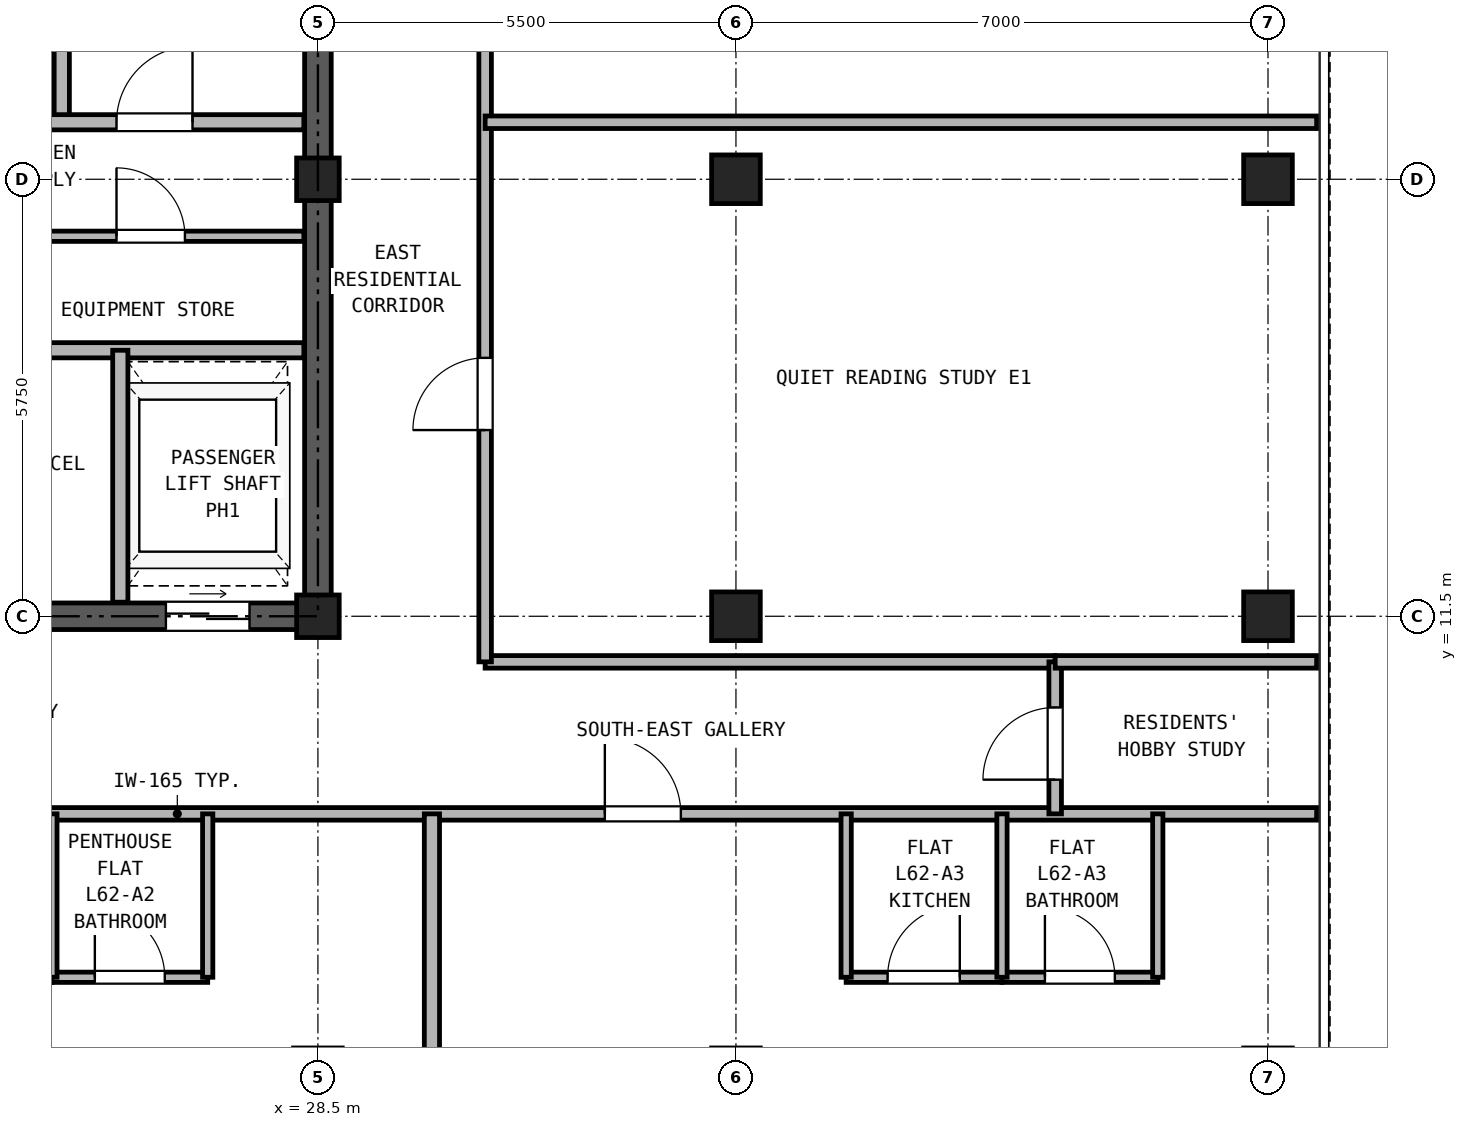
"""IFC4 building model, lengths in metres.
Left out: names, types, materials, properties, quantities, classifications, styles, units other than length and angle.
Written with IfcOpenShell. Run it as: python <this file> out.ifc"""

import sys

from ifc_helpers import new_model, si_unit, direction, frame, frame_2d, origin, origin_2d, place, context, subcontext, project, spatial, rectangle, hollow_rectangle, extrude, source, transform, mapped, element, fill, save


model = new_model("IFC4")
c1 = context("Model", 3, precision=1e-05, world=origin(), true_north=direction((0.0, 1.0)))
c2 = subcontext(c1, "Body", "Model", "MODEL_VIEW")
j1 = project(units=[si_unit("LENGTHUNIT", "METRE"), si_unit("PLANEANGLEUNIT", "RADIAN")], contexts=[c1])
p1 = place(None, origin())
s1 = spatial("IfcSite", under=j1, at=p1, CompositionType="ELEMENT")
p2 = place(p1, origin())
s2 = spatial("IfcBuilding", under=s1, at=p2, CompositionType="ELEMENT")
p3 = place(p2, frame((0.0, 0.0, 220.1)))
s3 = spatial("IfcBuildingStorey", under=s2, at=p3, CompositionType="ELEMENT", Elevation=220.1)
m1 = source(origin(), c2, "Body", "SweptSolid", [
    extrude(hollow_rectangle(XDim=0.64, YDim=0.64, WallThickness=0.035, at=origin_2d()), origin(), (0.0, 0.0, 1.0), 2.98),
])
for number, where, z_axis, x_axis in (
    (1, (41.0, 11.5, 0.0), (0.0, 0.0, 1.0), (1.0, 0.0, 0.0)),
    (2, (41.0, 17.25, 0.0), (0.0, 0.0, 1.0), (1.0, 0.0, 0.0)),
):
    element("IfcColumn", number, at=place(p3, frame(where, z_axis=z_axis, x_axis=x_axis)), inside=s3, PredefinedType="COLUMN", context=c2, shape_type="MappedRepresentation", body=[
        mapped(m1, transform((0.0, 0.0, 0.0), x_axis=(1.0, 0.0, 0.0), y_axis=(0.0, 1.0, 0.0), z_axis=(0.0, 0.0, 1.0), scale=1.0)),
    ])
m2 = source(origin(), c2, "Body", "SweptSolid", [
    extrude(hollow_rectangle(XDim=0.56, YDim=0.56, WallThickness=0.03, at=origin_2d()), origin(), (0.0, 0.0, 1.0), 2.98),
])
for number, where, z_axis, x_axis in (
    (3, (28.5, 11.5, 0.0), (0.0, 0.0, 1.0), (1.0, 0.0, 0.0)),
    (4, (28.5, 17.25, 0.0), (0.0, 0.0, 1.0), (1.0, 0.0, 0.0)),
):
    element("IfcColumn", number, at=place(p3, frame(where, z_axis=z_axis, x_axis=x_axis)), inside=s3, PredefinedType="COLUMN", context=c2, shape_type="MappedRepresentation", body=[
        mapped(m2, transform((0.0, 0.0, 0.0), x_axis=(1.0, 0.0, 0.0), y_axis=(0.0, 1.0, 0.0), z_axis=(0.0, 0.0, 1.0), scale=1.0)),
    ])
for number, where, z_axis, x_axis in (
    (5, (34.0, 11.5, 0.0), (0.0, 0.0, 1.0), (1.0, 0.0, 0.0)),
    (6, (34.0, 17.25, 0.0), (0.0, 0.0, 1.0), (1.0, 0.0, 0.0)),
):
    element("IfcColumn", number, at=place(p3, frame(where, z_axis=z_axis, x_axis=x_axis)), inside=s3, PredefinedType="COLUMN", context=c2, shape_type="MappedRepresentation", body=[
        mapped(m1, transform((0.0, 0.0, 0.0), x_axis=(1.0, 0.0, 0.0), y_axis=(0.0, 1.0, 0.0), z_axis=(0.0, 0.0, 1.0), scale=1.0)),
    ])
p4 = place(p3, frame((18.325, 11.5, 0.0), z_axis=(0.0, 0.0, 1.0), x_axis=(1.0, 0.0, 0.0)))
e7 = element("IfcWall", 7, at=p4, inside=s3, PredefinedType="SHEAR", context=c2, shape_type="SweptSolid", body=[
    extrude(rectangle(XDim=10.35, YDim=0.35, at=frame_2d((5.175, 0.0))), origin(), (0.0, 0.0, 1.0), 2.98),
])
p5 = place(p4, frame((1.775, 0.0, 0.0)))
e8 = element("IfcOpeningElement", 8, at=p5, cuts=e7, PredefinedType="OPENING", context=c2, shape_type="SweptSolid", body=[
    extrude(rectangle(XDim=0.95, YDim=2.15, at=frame_2d((0.475, 1.075))), frame((0.0, 0.185, 0.0), z_axis=(0.0, -1.0, 0.0), x_axis=(1.0, 0.0, 0.0)), (0.0, 0.0, 1.0), 0.37),
])
p6 = place(p4, frame((5.275, 0.0, 0.0)))
e9 = element("IfcOpeningElement", 9, at=p6, cuts=e7, PredefinedType="OPENING", context=c2, shape_type="SweptSolid", body=[
    extrude(rectangle(XDim=0.95, YDim=2.15, at=frame_2d((0.475, 1.075))), frame((0.0, 0.185, 0.0), z_axis=(0.0, -1.0, 0.0), x_axis=(1.0, 0.0, 0.0)), (0.0, 0.0, 1.0), 0.37),
])
p7 = place(p4, frame((8.175, 0.0, 0.0)))
e10 = element("IfcOpeningElement", 10, at=p7, cuts=e7, PredefinedType="OPENING", context=c2, shape_type="SweptSolid", body=[
    extrude(rectangle(XDim=1.1, YDim=2.25, at=frame_2d((0.55, 1.125))), frame((0.0, 0.185, 0.0), z_axis=(0.0, -1.0, 0.0), x_axis=(1.0, 0.0, 0.0)), (0.0, 0.0, 1.0), 0.37),
])
p8 = place(p3, frame((28.5, 11.675, 0.0), z_axis=(0.0, 0.0, 1.0), x_axis=(0.0, 1.0, 0.0)))
e11 = element("IfcWall", 11, at=p8, inside=s3, PredefinedType="SHEAR", context=c2, shape_type="SweptSolid", body=[
    extrude(rectangle(XDim=16.9, YDim=0.35, at=frame_2d((8.45, 0.0))), origin(), (0.0, 0.0, 1.0), 2.98),
])
p9 = place(p8, frame((7.475, 0.0, 0.0)))
e12 = element("IfcOpeningElement", 12, at=p9, cuts=e11, PredefinedType="OPENING", context=c2, shape_type="SweptSolid", body=[
    extrude(rectangle(XDim=1.15, YDim=2.2, at=frame_2d((0.575, 1.1))), frame((0.0, 0.185, 0.0), z_axis=(0.0, -1.0, 0.0), x_axis=(1.0, 0.0, 0.0)), (0.0, 0.0, 1.0), 0.37),
])
p10 = place(p3, frame((25.13, 18.0, 0.0), z_axis=(0.0, 0.0, 1.0), x_axis=(0.0, 1.0, 0.0)))
e13 = element("IfcWall", 13, at=p10, inside=s3, PredefinedType="PARTITIONING", context=c2, shape_type="SweptSolid", body=[
    extrude(rectangle(XDim=3.39, YDim=0.2, at=frame_2d((1.695, 0.0))), origin(), (0.0, 0.0, 1.0), 2.98),
])
p11 = place(p10, frame((1.1, 0.0, 0.0)))
e14 = element("IfcOpeningElement", 14, at=p11, cuts=e13, PredefinedType="OPENING", context=c2, shape_type="SweptSolid", body=[
    extrude(rectangle(XDim=1.15, YDim=2.2, at=frame_2d((0.575, 1.1))), frame((0.0, 0.11, 0.0), z_axis=(0.0, -1.0, 0.0), x_axis=(1.0, 0.0, 0.0)), (0.0, 0.0, 1.0), 0.22),
])
p12 = place(p3, frame((18.685, 18.0, 0.0), z_axis=(0.0, 0.0, 1.0), x_axis=(1.0, 0.0, 0.0)))
e15 = element("IfcWall", 15, at=p12, inside=s3, PredefinedType="PARTITIONING", context=c2, shape_type="SweptSolid", body=[
    extrude(rectangle(XDim=9.63, YDim=0.2, at=frame_2d((4.815, 0.0))), origin(), (0.0, 0.0, 1.0), 2.98),
])
p13 = place(p12, frame((0.565, 0.0, 0.0)))
e16 = element("IfcOpeningElement", 16, at=p13, cuts=e15, PredefinedType="OPENING", context=c2, shape_type="SweptSolid", body=[
    extrude(rectangle(XDim=1.3, YDim=2.3, at=frame_2d((0.65, 1.15))), frame((0.0, 0.11, 0.0), z_axis=(0.0, -1.0, 0.0), x_axis=(1.0, 0.0, 0.0)), (0.0, 0.0, 1.0), 0.22),
])
p14 = place(p12, frame((2.665, 0.0, 0.0)))
e17 = element("IfcOpeningElement", 17, at=p14, cuts=e15, PredefinedType="OPENING", context=c2, shape_type="SweptSolid", body=[
    extrude(rectangle(XDim=1.3, YDim=2.3, at=frame_2d((0.65, 1.15))), frame((0.0, 0.11, 0.0), z_axis=(0.0, -1.0, 0.0), x_axis=(1.0, 0.0, 0.0)), (0.0, 0.0, 1.0), 0.22),
])
p15 = place(p12, frame((7.165, 0.0, 0.0)))
e18 = element("IfcOpeningElement", 18, at=p15, cuts=e15, PredefinedType="OPENING", context=c2, shape_type="SweptSolid", body=[
    extrude(rectangle(XDim=1.0, YDim=2.15, at=frame_2d((0.5, 1.075))), frame((0.0, 0.11, 0.0), z_axis=(0.0, -1.0, 0.0), x_axis=(1.0, 0.0, 0.0)), (0.0, 0.0, 1.0), 0.22),
])
p16 = place(p3, frame((18.685, 15.0, 0.0), z_axis=(0.0, 0.0, 1.0), x_axis=(1.0, 0.0, 0.0)))
e19 = element("IfcWall", 19, at=p16, inside=s3, PredefinedType="PARTITIONING", context=c2, shape_type="SweptSolid", body=[
    extrude(rectangle(XDim=9.63, YDim=0.2, at=frame_2d((4.815, 0.0))), origin(), (0.0, 0.0, 1.0), 2.98),
])
p17 = place(p3, frame((23.3, 16.5, 0.0), z_axis=(0.0, 0.0, 1.0), x_axis=(1.0, 0.0, 0.0)))
e20 = element("IfcWall", 20, at=p17, inside=s3, PredefinedType="PARTITIONING", context=c2, shape_type="SweptSolid", body=[
    extrude(rectangle(XDim=5.015, YDim=0.135, at=frame_2d((2.507, 0.0))), origin(), (0.0, 0.0, 1.0), 2.98),
])
p18 = place(p17, frame((2.55, 0.0, 0.0)))
e21 = element("IfcOpeningElement", 21, at=p18, cuts=e20, PredefinedType="OPENING", context=c2, shape_type="SweptSolid", body=[
    extrude(rectangle(XDim=0.9, YDim=2.05, at=frame_2d((0.45, 1.025))), frame((0.0, 0.077, 0.0), z_axis=(0.0, -1.0, 0.0), x_axis=(1.0, 0.0, 0.0)), (0.0, 0.0, 1.0), 0.155),
])
p19 = place(p3, frame((25.9, 11.685, 0.0), z_axis=(0.0, 0.0, 1.0), x_axis=(0.0, 1.0, 0.0)))
e22 = element("IfcWall", 22, at=p19, inside=s3, PredefinedType="PARTITIONING", context=c2, shape_type="SweptSolid", body=[
    extrude(rectangle(XDim=3.315, YDim=0.2, at=frame_2d((1.657, 0.0))), origin(), (0.0, 0.0, 1.0), 2.98),
])
p20 = place(p3, frame((5.36, 8.9, 0.0), z_axis=(0.0, 0.0, 1.0), x_axis=(1.0, 0.0, 0.0)))
e23 = element("IfcWall", 23, at=p20, inside=s3, PredefinedType="PARTITIONING", context=c2, shape_type="SweptSolid", body=[
    extrude(rectangle(XDim=36.28, YDim=0.165, at=frame_2d((18.14, 0.0))), origin(), (0.0, 0.0, 1.0), 2.98),
])
p21 = place(p20, frame((8.865, 0.0, 0.0)))
e24 = element("IfcOpeningElement", 24, at=p21, cuts=e23, PredefinedType="OPENING", context=c2, shape_type="SweptSolid", body=[
    extrude(rectangle(XDim=1.0, YDim=2.15, at=frame_2d((0.5, 1.075))), frame((0.0, 0.093, 0.0), z_axis=(0.0, -1.0, 0.0), x_axis=(1.0, 0.0, 0.0)), (0.0, 0.0, 1.0), 0.185),
])
p22 = place(p20, frame((14.665, 0.0, 0.0)))
e25 = element("IfcOpeningElement", 25, at=p22, cuts=e23, PredefinedType="OPENING", context=c2, shape_type="SweptSolid", body=[
    extrude(rectangle(XDim=1.0, YDim=2.15, at=frame_2d((0.5, 1.075))), frame((0.0, 0.093, 0.0), z_axis=(0.0, -1.0, 0.0), x_axis=(1.0, 0.0, 0.0)), (0.0, 0.0, 1.0), 0.185),
])
p23 = place(p20, frame((26.915, 0.0, 0.0)))
e26 = element("IfcOpeningElement", 26, at=p23, cuts=e23, PredefinedType="OPENING", context=c2, shape_type="SweptSolid", body=[
    extrude(rectangle(XDim=1.0, YDim=2.15, at=frame_2d((0.5, 1.075))), frame((0.0, 0.093, 0.0), z_axis=(0.0, -1.0, 0.0), x_axis=(1.0, 0.0, 0.0)), (0.0, 0.0, 1.0), 0.185),
])
p24 = place(p3, frame((30.7, 10.9, 0.0), z_axis=(0.0, 0.0, 1.0), x_axis=(1.0, 0.0, 0.0)))
e27 = element("IfcWall", 27, at=p24, inside=s3, PredefinedType="PARTITIONING", context=c2, shape_type="SweptSolid", body=[
    extrude(rectangle(XDim=7.5, YDim=0.165, at=frame_2d((3.75, 0.0))), origin(), (0.0, 0.0, 1.0), 2.98),
])
p25 = place(p3, frame((38.2, 8.9, 0.0), z_axis=(0.0, 0.0, 1.0), x_axis=(0.0, 1.0, 0.0)))
e28 = element("IfcWall", 28, at=p25, inside=s3, PredefinedType="PARTITIONING", context=c2, shape_type="SweptSolid", body=[
    extrude(rectangle(XDim=2.0, YDim=0.165, at=frame_2d((1.0, 0.0))), origin(), (0.0, 0.0, 1.0), 2.98),
])
p26 = place(p25, frame((0.45, 0.0, 0.0)))
e29 = element("IfcOpeningElement", 29, at=p26, cuts=e28, PredefinedType="OPENING", context=c2, shape_type="SweptSolid", body=[
    extrude(rectangle(XDim=0.95, YDim=2.15, at=frame_2d((0.475, 1.075))), frame((0.0, 0.093, 0.0), z_axis=(0.0, -1.0, 0.0), x_axis=(1.0, 0.0, 0.0)), (0.0, 0.0, 1.0), 0.185),
])
p27 = place(p3, frame((30.7, 10.9, 0.0), z_axis=(0.0, 0.0, 1.0), x_axis=(0.0, 1.0, 0.0)))
e30 = element("IfcWall", 30, at=p27, inside=s3, PredefinedType="PARTITIONING", context=c2, shape_type="SweptSolid", body=[
    extrude(rectangle(XDim=24.24, YDim=0.165, at=frame_2d((12.12, 0.0))), origin(), (0.0, 0.0, 1.0), 2.98),
])
p28 = place(p27, frame((3.05, 0.0, 0.0)))
e31 = element("IfcOpeningElement", 31, at=p28, cuts=e30, PredefinedType="OPENING", context=c2, shape_type="SweptSolid", body=[
    extrude(rectangle(XDim=0.95, YDim=2.15, at=frame_2d((0.475, 1.075))), frame((0.0, 0.093, 0.0), z_axis=(0.0, -1.0, 0.0), x_axis=(1.0, 0.0, 0.0)), (0.0, 0.0, 1.0), 0.185),
])
p29 = place(p27, frame((9.85, 0.0, 0.0)))
e32 = element("IfcOpeningElement", 32, at=p29, cuts=e30, PredefinedType="OPENING", context=c2, shape_type="SweptSolid", body=[
    extrude(rectangle(XDim=0.95, YDim=2.15, at=frame_2d((0.475, 1.075))), frame((0.0, 0.093, 0.0), z_axis=(0.0, -1.0, 0.0), x_axis=(1.0, 0.0, 0.0)), (0.0, 0.0, 1.0), 0.185),
])
p30 = place(p27, frame((15.95, 0.0, 0.0)))
e33 = element("IfcOpeningElement", 33, at=p30, cuts=e30, PredefinedType="OPENING", context=c2, shape_type="SweptSolid", body=[
    extrude(rectangle(XDim=0.95, YDim=2.15, at=frame_2d((0.475, 1.075))), frame((0.0, 0.093, 0.0), z_axis=(0.0, -1.0, 0.0), x_axis=(1.0, 0.0, 0.0)), (0.0, 0.0, 1.0), 0.185),
])
p31 = place(p27, frame((21.27, 0.0, 0.0)))
e34 = element("IfcOpeningElement", 34, at=p31, cuts=e30, PredefinedType="OPENING", context=c2, shape_type="SweptSolid", body=[
    extrude(rectangle(XDim=0.95, YDim=2.15, at=frame_2d((0.475, 1.075))), frame((0.0, 0.093, 0.0), z_axis=(0.0, -1.0, 0.0), x_axis=(1.0, 0.0, 0.0)), (0.0, 0.0, 1.0), 0.185),
])
p32 = place(p3, frame((25.0, 6.75, 0.0), z_axis=(0.0, 0.0, 1.0), x_axis=(1.0, 0.0, 0.0)))
e35 = element("IfcWall", 35, at=p32, inside=s3, PredefinedType="PARTITIONING", context=c2, shape_type="SweptSolid", body=[
    extrude(rectangle(XDim=2.05, YDim=0.135, at=frame_2d((1.025, 0.0))), origin(), (0.0, 0.0, 1.0), 2.98),
])
p33 = place(p32, frame((0.565, 0.0, 0.0)))
e36 = element("IfcOpeningElement", 36, at=p33, cuts=e35, PredefinedType="OPENING", context=c2, shape_type="SweptSolid", body=[
    extrude(rectangle(XDim=0.92, YDim=2.1, at=frame_2d((0.46, 1.05))), frame((0.0, 0.077, 0.0), z_axis=(0.0, -1.0, 0.0), x_axis=(1.0, 0.0, 0.0)), (0.0, 0.0, 1.0), 0.155),
])
for number, where, z_axis, x_axis in (
    (37, (25.0, 6.75, 0.0), (0.0, 0.0, 1.0), (0.0, 1.0, 0.0)),
    (38, (27.05, 6.75, 0.0), (0.0, 0.0, 1.0), (0.0, 1.0, 0.0)),
):
    element("IfcWall", number, at=place(p3, frame(where, z_axis=z_axis, x_axis=x_axis)), inside=s3, PredefinedType="PARTITIONING", context=c2, shape_type="SweptSolid", body=[
        extrude(rectangle(XDim=2.15, YDim=0.135, at=frame_2d((1.075, 0.0))), origin(), (0.0, 0.0, 1.0), 2.98),
    ])
p34 = place(p3, frame((30.0, 0.16, 0.0), z_axis=(0.0, 0.0, 1.0), x_axis=(0.0, 1.0, 0.0)))
e39 = element("IfcWall", 39, at=p34, inside=s3, PredefinedType="PARTITIONING", context=c2, shape_type="SweptSolid", body=[
    extrude(rectangle(XDim=8.74, YDim=0.2, at=frame_2d((4.37, 0.0))), origin(), (0.0, 0.0, 1.0), 2.98),
])
p35 = place(p3, frame((35.45, 6.75, 0.0), z_axis=(0.0, 0.0, 1.0), x_axis=(1.0, 0.0, 0.0)))
e40 = element("IfcWall", 40, at=p35, inside=s3, PredefinedType="PARTITIONING", context=c2, shape_type="SweptSolid", body=[
    extrude(rectangle(XDim=2.05, YDim=0.135, at=frame_2d((1.025, 0.0))), origin(), (0.0, 0.0, 1.0), 2.98),
])
p36 = place(p35, frame((0.545, 0.0, 0.0)))
e41 = element("IfcOpeningElement", 41, at=p36, cuts=e40, PredefinedType="OPENING", context=c2, shape_type="SweptSolid", body=[
    extrude(rectangle(XDim=0.95, YDim=2.15, at=frame_2d((0.475, 1.075))), frame((0.0, 0.077, 0.0), z_axis=(0.0, -1.0, 0.0), x_axis=(1.0, 0.0, 0.0)), (0.0, 0.0, 1.0), 0.155),
])
p37 = place(p3, frame((37.5, 6.75, 0.0), z_axis=(0.0, 0.0, 1.0), x_axis=(1.0, 0.0, 0.0)))
e42 = element("IfcWall", 42, at=p37, inside=s3, PredefinedType="PARTITIONING", context=c2, shape_type="SweptSolid", body=[
    extrude(rectangle(XDim=2.05, YDim=0.135, at=frame_2d((1.025, 0.0))), origin(), (0.0, 0.0, 1.0), 2.98),
])
p38 = place(p37, frame((0.565, 0.0, 0.0)))
e43 = element("IfcOpeningElement", 43, at=p38, cuts=e42, PredefinedType="OPENING", context=c2, shape_type="SweptSolid", body=[
    extrude(rectangle(XDim=0.92, YDim=2.1, at=frame_2d((0.46, 1.05))), frame((0.0, 0.077, 0.0), z_axis=(0.0, -1.0, 0.0), x_axis=(1.0, 0.0, 0.0)), (0.0, 0.0, 1.0), 0.155),
])
for number, where, z_axis, x_axis in (
    (44, (35.45, 6.75, 0.0), (0.0, 0.0, 1.0), (0.0, 1.0, 0.0)),
    (45, (37.5, 6.75, 0.0), (0.0, 0.0, 1.0), (0.0, 1.0, 0.0)),
    (46, (39.55, 6.75, 0.0), (0.0, 0.0, 1.0), (0.0, 1.0, 0.0)),
):
    element("IfcWall", number, at=place(p3, frame(where, z_axis=z_axis, x_axis=x_axis)), inside=s3, PredefinedType="PARTITIONING", context=c2, shape_type="SweptSolid", body=[
        extrude(rectangle(XDim=2.15, YDim=0.135, at=frame_2d((1.075, 0.0))), origin(), (0.0, 0.0, 1.0), 2.98),
    ])
p39 = place(p3, frame((38.2, 10.9, 0.0), z_axis=(0.0, 0.0, 1.0), x_axis=(1.0, 0.0, 0.0)))
e47 = element("IfcWall", 47, at=p39, inside=s3, PredefinedType="PARTITIONING", context=c2, shape_type="SweptSolid", body=[
    extrude(rectangle(XDim=3.44, YDim=0.165, at=frame_2d((1.72, 0.0))), origin(), (0.0, 0.0, 1.0), 2.98),
])
p40 = place(p3, frame((30.7, 18.0, 0.0), z_axis=(0.0, 0.0, 1.0), x_axis=(1.0, 0.0, 0.0)))
e48 = element("IfcWall", 48, at=p40, inside=s3, PredefinedType="PARTITIONING", context=c2, shape_type="SweptSolid", body=[
    extrude(rectangle(XDim=10.94, YDim=0.165, at=frame_2d((5.47, 0.0))), origin(), (0.0, 0.0, 1.0), 2.98),
])
p41 = place(p15, frame((1.0, 0.0, 0.0), z_axis=(0.0, 0.0, 1.0), x_axis=(-1.0, 0.0, 0.0)))
e49 = element("IfcDoor", 49, at=p41, inside=s3, OperationType="SINGLE_SWING_RIGHT", PredefinedType="DOOR", context=c2, shape_type="SweptSolid", body=[
    extrude(rectangle(XDim=1.0, YDim=2.15, at=frame_2d((0.5, 1.075))), frame((0.0, 0.025, 0.0), z_axis=(0.0, -1.0, 0.0), x_axis=(1.0, 0.0, 0.0)), (0.0, 0.0, 1.0), 0.05),
])
fill(e18, e49)
p42 = place(p18, frame((0.9, 0.0, 0.0), z_axis=(0.0, 0.0, 1.0), x_axis=(-1.0, 0.0, 0.0)))
e50 = element("IfcDoor", 50, at=p42, inside=s3, OperationType="SINGLE_SWING_LEFT", PredefinedType="DOOR", context=c2, shape_type="SweptSolid", body=[
    extrude(rectangle(XDim=0.9, YDim=2.05, at=frame_2d((0.45, 1.025))), frame((0.0, 0.025, 0.0), z_axis=(0.0, -1.0, 0.0), x_axis=(1.0, 0.0, 0.0)), (0.0, 0.0, 1.0), 0.05),
])
fill(e21, e50)
p43 = place(p7, frame((1.1, 0.0, 0.0), z_axis=(0.0, 0.0, 1.0), x_axis=(-1.0, 0.0, 0.0)))
e51 = element("IfcDoor", 51, at=p43, inside=s3, OperationType="DOUBLE_DOOR_SLIDING", PredefinedType="DOOR", context=c2, shape_type="SweptSolid", body=[
    extrude(rectangle(XDim=1.1, YDim=2.25, at=frame_2d((0.55, 1.125))), frame((0.0, 0.025, 0.0), z_axis=(0.0, -1.0, 0.0), x_axis=(1.0, 0.0, 0.0)), (0.0, 0.0, 1.0), 0.05),
])
fill(e10, e51)
p44 = place(p33, origin())
e52 = element("IfcDoor", 52, at=p44, inside=s3, OperationType="SINGLE_SWING_LEFT", PredefinedType="DOOR", context=c2, shape_type="SweptSolid", body=[
    extrude(rectangle(XDim=0.92, YDim=2.1, at=frame_2d((0.46, 1.05))), frame((0.0, 0.025, 0.0), z_axis=(0.0, -1.0, 0.0), x_axis=(1.0, 0.0, 0.0)), (0.0, 0.0, 1.0), 0.05),
])
fill(e36, e52)
p45 = place(p36, origin())
e53 = element("IfcDoor", 53, at=p45, inside=s3, OperationType="SINGLE_SWING_RIGHT", PredefinedType="DOOR", context=c2, shape_type="SweptSolid", body=[
    extrude(rectangle(XDim=0.95, YDim=2.15, at=frame_2d((0.475, 1.075))), frame((0.0, 0.025, 0.0), z_axis=(0.0, -1.0, 0.0), x_axis=(1.0, 0.0, 0.0)), (0.0, 0.0, 1.0), 0.05),
])
fill(e41, e53)
p46 = place(p38, origin())
e54 = element("IfcDoor", 54, at=p46, inside=s3, OperationType="SINGLE_SWING_LEFT", PredefinedType="DOOR", context=c2, shape_type="SweptSolid", body=[
    extrude(rectangle(XDim=0.92, YDim=2.1, at=frame_2d((0.46, 1.05))), frame((0.0, 0.025, 0.0), z_axis=(0.0, -1.0, 0.0), x_axis=(1.0, 0.0, 0.0)), (0.0, 0.0, 1.0), 0.05),
])
fill(e43, e54)
p47 = place(p23, frame((1.0, 0.0, 0.0), z_axis=(0.0, 0.0, 1.0), x_axis=(-1.0, 0.0, 0.0)))
e55 = element("IfcDoor", 55, at=p47, inside=s3, OperationType="SINGLE_SWING_LEFT", PredefinedType="DOOR", context=c2, shape_type="SweptSolid", body=[
    extrude(rectangle(XDim=1.0, YDim=2.15, at=frame_2d((0.5, 1.075))), frame((0.0, 0.025, 0.0), z_axis=(0.0, -1.0, 0.0), x_axis=(1.0, 0.0, 0.0)), (0.0, 0.0, 1.0), 0.05),
])
fill(e26, e55)
p48 = place(p26, origin())
e56 = element("IfcDoor", 56, at=p48, inside=s3, OperationType="SINGLE_SWING_LEFT", PredefinedType="DOOR", context=c2, shape_type="SweptSolid", body=[
    extrude(rectangle(XDim=0.95, YDim=2.15, at=frame_2d((0.475, 1.075))), frame((0.0, 0.025, 0.0), z_axis=(0.0, -1.0, 0.0), x_axis=(1.0, 0.0, 0.0)), (0.0, 0.0, 1.0), 0.05),
])
fill(e29, e56)
p49 = place(p28, origin())
e57 = element("IfcDoor", 57, at=p49, inside=s3, OperationType="SINGLE_SWING_LEFT", PredefinedType="DOOR", context=c2, shape_type="SweptSolid", body=[
    extrude(rectangle(XDim=0.95, YDim=2.15, at=frame_2d((0.475, 1.075))), frame((0.0, 0.025, 0.0), z_axis=(0.0, -1.0, 0.0), x_axis=(1.0, 0.0, 0.0)), (0.0, 0.0, 1.0), 0.05),
])
fill(e31, e57)
save(model, sys.argv[1])
